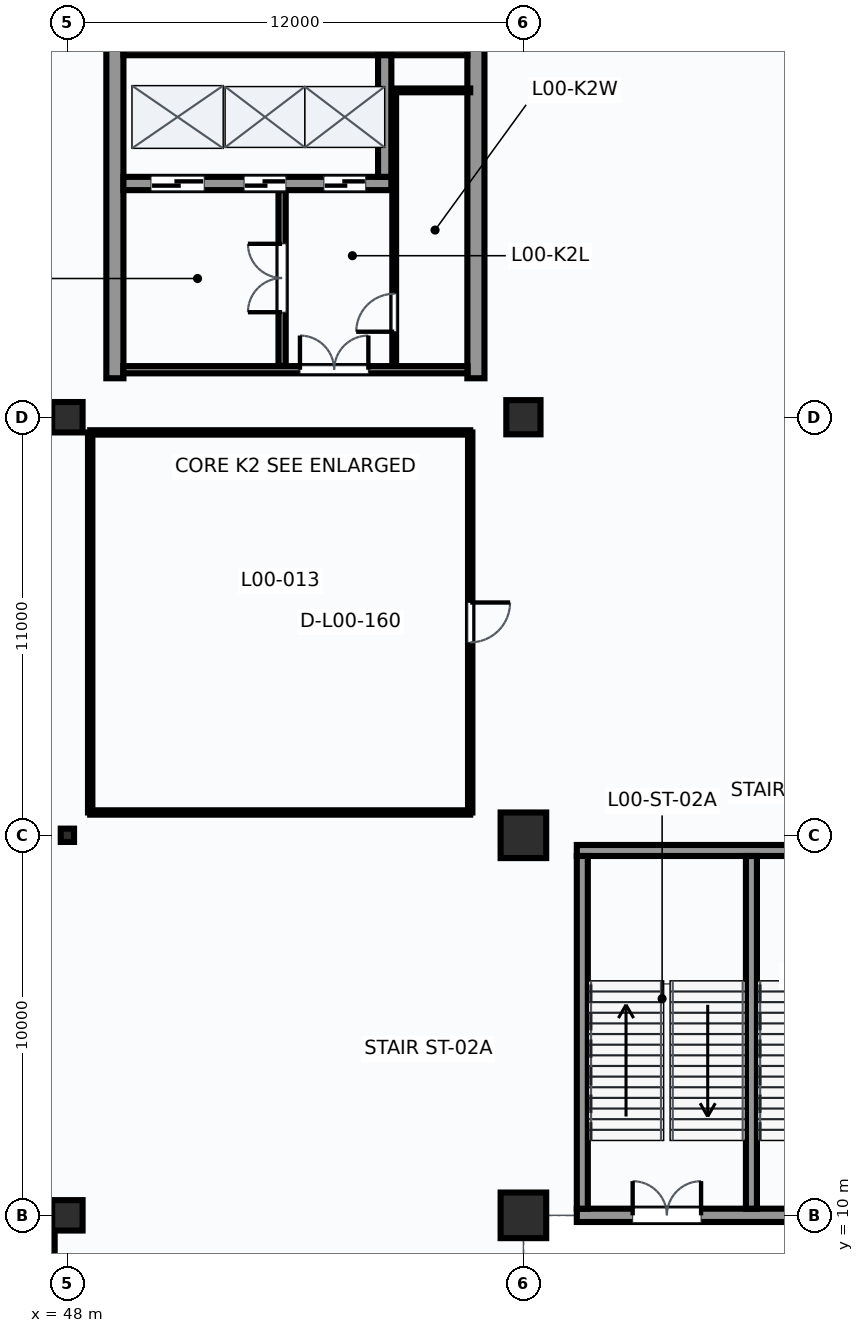
"""IFC4 building model, lengths in metres.
Left out: names, types, materials, properties, quantities, classifications, styles, units other than length and angle.
Written with IfcOpenShell. Run it as: python <this file> out.ifc"""

import sys

from ifc_helpers import new_model, si_unit, direction, frame, frame_2d, origin, origin_2d, place, context, subcontext, project, spatial, rectangle, hollow_rectangle, circle, extrude, element, fill, save


model = new_model("IFC4")
c1 = context("Model", 3, precision=1e-05, world=origin(), true_north=direction((0.0, 1.0)))
c2 = subcontext(c1, "Body", "Model", "MODEL_VIEW")
j1 = project(units=[si_unit("LENGTHUNIT", "METRE"), si_unit("PLANEANGLEUNIT", "RADIAN")], contexts=[c1])
p1 = place(None, origin())
s1 = spatial("IfcSite", under=j1, at=p1, CompositionType="ELEMENT")
p2 = place(p1, origin())
s2 = spatial("IfcBuilding", under=s1, at=p2, CompositionType="ELEMENT")
p3 = place(p2, origin())
s3 = spatial("IfcBuildingStorey", under=s2, at=p3, CompositionType="ELEMENT", Elevation=0.0)
p4 = place(p3, frame((48.0, 10.0, 0.0), z_axis=(0.0, 0.0, 1.0), x_axis=(1.0, 0.0, 0.0)))
e1 = element("IfcColumn", 1, at=p4, inside=s3, PredefinedType="COLUMN", context=c2, shape_type="SweptSolid", body=[
    extrude(rectangle(XDim=0.8, YDim=0.8, at=origin_2d()), origin(), (0.0, 0.0, 1.0), 5.4),
])
p5 = place(p3, frame((48.0, 20.0, 0.0), z_axis=(0.0, 0.0, 1.0), x_axis=(1.0, 0.0, 0.0)))
e2 = element("IfcColumn", 2, at=p5, inside=s3, PredefinedType="COLUMN", context=c2, shape_type="SweptSolid", body=[
    extrude(hollow_rectangle(XDim=0.35, YDim=0.35, WallThickness=0.016, InnerFilletRadius=0.016, OuterFilletRadius=0.032, at=origin_2d()), origin(), (0.0, 0.0, 1.0), 5.4),
])
p6 = place(p3, frame((48.0, 31.0, 0.0), z_axis=(0.0, 0.0, 1.0), x_axis=(1.0, 0.0, 0.0)))
e3 = element("IfcColumn", 3, at=p6, inside=s3, PredefinedType="COLUMN", context=c2, shape_type="SweptSolid", body=[
    extrude(rectangle(XDim=0.8, YDim=0.8, at=origin_2d()), origin(), (0.0, 0.0, 1.0), 5.4),
])
for number, where, z_axis, x_axis in (
    (4, (60.0, 10.0, 0.0), (0.0, 0.0, 1.0), (1.0, 0.0, 0.0)),
    (5, (60.0, 20.0, 0.0), (0.0, 0.0, 1.0), (1.0, 0.0, 0.0)),
):
    element("IfcColumn", number, at=place(p3, frame(where, z_axis=z_axis, x_axis=x_axis)), inside=s3, PredefinedType="COLUMN", context=c2, shape_type="SweptSolid", body=[
        extrude(rectangle(XDim=1.2, YDim=1.2, at=origin_2d()), origin(), (0.0, 0.0, 1.0), 5.4),
    ])
p7 = place(p3, frame((60.0, 31.0, 0.0), z_axis=(0.0, 0.0, 1.0), x_axis=(1.0, 0.0, 0.0)))
e6 = element("IfcColumn", 6, at=p7, inside=s3, PredefinedType="COLUMN", context=c2, shape_type="SweptSolid", body=[
    extrude(circle(Radius=0.45, at=origin_2d()), origin(), (0.0, 0.0, 1.0), 5.4),
])
p8 = place(p3, frame((61.405, 10.0, 0.0), z_axis=(0.0, 0.0, 1.0), x_axis=(1.0, 0.0, 0.0)))
e7 = element("IfcWall", 7, at=p8, inside=s3, PredefinedType="SHEAR", context=c2, shape_type="SweptSolid", body=[
    extrude(rectangle(XDim=9.19, YDim=0.35, at=frame_2d((4.595, 0.0))), origin(), (0.0, 0.0, 1.0), 4.347),
])
p9 = place(p8, frame((1.47, 0.0, 0.0)))
e8 = element("IfcOpeningElement", 8, at=p9, cuts=e7, PredefinedType="OPENING", context=c2, shape_type="SweptSolid", body=[
    extrude(rectangle(XDim=1.8, YDim=2.2, at=frame_2d((0.9, 1.1))), frame((0.0, 0.185, 0.0), z_axis=(0.0, -1.0, 0.0), x_axis=(1.0, 0.0, 0.0)), (0.0, 0.0, 1.0), 0.37),
])
p10 = place(p8, frame((6.02, 0.0, 0.0)))
e9 = element("IfcOpeningElement", 9, at=p10, cuts=e7, PredefinedType="OPENING", context=c2, shape_type="SweptSolid", body=[
    extrude(rectangle(XDim=1.6, YDim=2.2, at=frame_2d((0.8, 1.1))), frame((0.0, 0.185, 0.0), z_axis=(0.0, -1.0, 0.0), x_axis=(1.0, 0.0, 0.0)), (0.0, 0.0, 1.0), 0.37),
])
p11 = place(p3, frame((61.405, 19.6, 0.0), z_axis=(0.0, 0.0, 1.0), x_axis=(1.0, 0.0, 0.0)))
e10 = element("IfcWall", 10, at=p11, inside=s3, PredefinedType="SHEAR", context=c2, shape_type="SweptSolid", body=[
    extrude(rectangle(XDim=9.19, YDim=0.29, at=frame_2d((4.595, 0.0))), origin(), (0.0, 0.0, 1.0), 5.4),
])
for number, where, z_axis, x_axis in (
    (11, (61.55, 10.175, 0.0), (0.0, 0.0, 1.0), (0.0, 1.0, 0.0)),
    (12, (66.0, 10.175, 0.0), (0.0, 0.0, 1.0), (0.0, 1.0, 0.0)),
):
    element("IfcWall", number, at=place(p3, frame(where, z_axis=z_axis, x_axis=x_axis)), inside=s3, PredefinedType="SHEAR", context=c2, shape_type="SweptSolid", body=[
        extrude(rectangle(XDim=9.28, YDim=0.29, at=frame_2d((4.64, 0.0))), origin(), (0.0, 0.0, 1.0), 5.4),
    ])
for number, where, z_axis, x_axis in (
    (13, (49.25, 32.025, 0.0), (0.0, 0.0, 1.0), (0.0, 1.0, 0.0)),
    (14, (58.75, 32.025, 0.0), (0.0, 0.0, 1.0), (0.0, 1.0, 0.0)),
):
    element("IfcWall", number, at=place(p3, frame(where, z_axis=z_axis, x_axis=x_axis)), inside=s3, PredefinedType="SHEAR", context=c2, shape_type="SweptSolid", body=[
        extrude(rectangle(XDim=8.95, YDim=0.45, at=frame_2d((4.475, 0.0))), origin(), (0.0, 0.0, 1.0), 5.4),
    ])
p12 = place(p3, frame((49.475, 40.75, 0.0), z_axis=(0.0, 0.0, 1.0), x_axis=(1.0, 0.0, 0.0)))
e15 = element("IfcWall", 15, at=p12, inside=s3, PredefinedType="SHEAR", context=c2, shape_type="SweptSolid", body=[
    extrude(rectangle(XDim=9.05, YDim=0.45, at=frame_2d((4.525, 0.0))), origin(), (0.0, 0.0, 1.0), 5.4),
])
p13 = place(p3, frame((49.475, 37.15, 0.0), z_axis=(0.0, 0.0, 1.0), x_axis=(1.0, 0.0, 0.0)))
e16 = element("IfcWall", 16, at=p13, inside=s3, PredefinedType="SHEAR", context=c2, shape_type="SweptSolid", body=[
    extrude(rectangle(XDim=7.05, YDim=0.35, at=frame_2d((3.525, 0.0))), origin(), (0.0, 0.0, 1.0), 5.4),
])
p14 = place(p13, frame((0.725, 0.0, 0.0)))
e17 = element("IfcOpeningElement", 17, at=p14, cuts=e16, PredefinedType="OPENING", context=c2, shape_type="SweptSolid", body=[
    extrude(rectangle(XDim=1.4, YDim=2.3, at=frame_2d((0.7, 1.15))), frame((0.0, 0.185, 0.0), z_axis=(0.0, -1.0, 0.0), x_axis=(1.0, 0.0, 0.0)), (0.0, 0.0, 1.0), 0.37),
])
p15 = place(p13, frame((3.175, 0.0, 0.0)))
e18 = element("IfcOpeningElement", 18, at=p15, cuts=e16, PredefinedType="OPENING", context=c2, shape_type="SweptSolid", body=[
    extrude(rectangle(XDim=1.1, YDim=2.2, at=frame_2d((0.55, 1.1))), frame((0.0, 0.185, 0.0), z_axis=(0.0, -1.0, 0.0), x_axis=(1.0, 0.0, 0.0)), (0.0, 0.0, 1.0), 0.37),
])
p16 = place(p13, frame((5.275, 0.0, 0.0)))
e19 = element("IfcOpeningElement", 19, at=p16, cuts=e16, PredefinedType="OPENING", context=c2, shape_type="SweptSolid", body=[
    extrude(rectangle(XDim=1.1, YDim=2.2, at=frame_2d((0.55, 1.1))), frame((0.0, 0.185, 0.0), z_axis=(0.0, -1.0, 0.0), x_axis=(1.0, 0.0, 0.0)), (0.0, 0.0, 1.0), 0.37),
])
p17 = place(p3, frame((56.35, 37.325, 0.0), z_axis=(0.0, 0.0, 1.0), x_axis=(0.0, 1.0, 0.0)))
e20 = element("IfcWall", 20, at=p17, inside=s3, PredefinedType="SHEAR", context=c2, shape_type="SweptSolid", body=[
    extrude(rectangle(XDim=3.2, YDim=0.35, at=frame_2d((1.6, 0.0))), origin(), (0.0, 0.0, 1.0), 5.4),
])
p18 = place(p3, frame((49.47, 32.25, 0.0), z_axis=(0.0, 0.0, 1.0), x_axis=(1.0, 0.0, 0.0)))
e21 = element("IfcWall", 21, at=p18, inside=s3, PredefinedType="PARTITIONING", context=c2, shape_type="SweptSolid", body=[
    extrude(rectangle(XDim=9.06, YDim=0.19, at=frame_2d((4.53, 0.0))), origin(), (0.0, 0.0, 1.0), 5.06),
])
p19 = place(p18, frame((4.65, 0.0, 0.0)))
e22 = element("IfcOpeningElement", 22, at=p19, cuts=e21, PredefinedType="OPENING", context=c2, shape_type="SweptSolid", body=[
    extrude(rectangle(XDim=1.8, YDim=2.3, at=frame_2d((0.9, 1.15))), frame((0.0, 0.105, 0.0), z_axis=(0.0, -1.0, 0.0), x_axis=(1.0, 0.0, 0.0)), (0.0, 0.0, 1.0), 0.21),
])
p20 = place(p3, frame((53.65, 32.35, 0.0), z_axis=(0.0, 0.0, 1.0), x_axis=(0.0, 1.0, 0.0)))
e23 = element("IfcWall", 23, at=p20, inside=s3, PredefinedType="PARTITIONING", context=c2, shape_type="SweptSolid", body=[
    extrude(rectangle(XDim=4.625, YDim=0.19, at=frame_2d((2.312, 0.0))), origin(), (0.0, 0.0, 1.0), 5.06),
])
p21 = place(p20, frame((1.413, 0.0, 0.0)))
e24 = element("IfcOpeningElement", 24, at=p21, cuts=e23, PredefinedType="OPENING", context=c2, shape_type="SweptSolid", body=[
    extrude(rectangle(XDim=1.8, YDim=2.2, at=frame_2d((0.9, 1.1))), frame((0.0, 0.105, 0.0), z_axis=(0.0, -1.0, 0.0), x_axis=(1.0, 0.0, 0.0)), (0.0, 0.0, 1.0), 0.21),
])
p22 = place(p3, frame((56.6, 32.35, 0.0), z_axis=(0.0, 0.0, 1.0), x_axis=(0.0, 1.0, 0.0)))
e25 = element("IfcWall", 25, at=p22, inside=s3, PredefinedType="PARTITIONING", context=c2, shape_type="SweptSolid", body=[
    extrude(rectangle(XDim=7.25, YDim=0.1, at=frame_2d((3.625, 0.0))), origin(), (0.0, 0.0, 1.0), 5.06),
])
p23 = place(p22, frame((0.9, 0.0, 0.0)))
e26 = element("IfcOpeningElement", 26, at=p23, cuts=e25, PredefinedType="OPENING", context=c2, shape_type="SweptSolid", body=[
    extrude(rectangle(XDim=1.0, YDim=2.1, at=frame_2d((0.5, 1.05))), frame((0.0, 0.06, 0.0), z_axis=(0.0, -1.0, 0.0), x_axis=(1.0, 0.0, 0.0)), (0.0, 0.0, 1.0), 0.12),
])
p24 = place(p3, frame((56.6, 39.6, 0.0), z_axis=(0.0, 0.0, 1.0), x_axis=(1.0, 0.0, 0.0)))
e27 = element("IfcWall", 27, at=p24, inside=s3, PredefinedType="PARTITIONING", context=c2, shape_type="SweptSolid", body=[
    extrude(rectangle(XDim=2.0, YDim=0.1, at=frame_2d((1.0, 0.0))), origin(), (0.0, 0.0, 1.0), 5.06),
])
p25 = place(p3, frame((58.6, 30.6, 0.0), z_axis=(0.0, 0.0, 1.0), x_axis=(0.0, -1.0, 0.0)))
e28 = element("IfcWall", 28, at=p25, inside=s3, PredefinedType="PARTITIONING", context=c2, shape_type="SweptSolid", body=[
    extrude(rectangle(XDim=10.0, YDim=0.115, at=frame_2d((5.0, 0.0))), origin(), (0.0, 0.0, 1.0), 4.567),
])
p26 = place(p25, frame((4.475, 0.0, 0.0)))
e29 = element("IfcOpeningElement", 29, at=p26, cuts=e28, PredefinedType="OPENING", context=c2, shape_type="SweptSolid", body=[
    extrude(rectangle(XDim=1.05, YDim=2.2, at=frame_2d((0.525, 1.1))), frame((0.0, 0.067, 0.0), z_axis=(0.0, -1.0, 0.0), x_axis=(1.0, 0.0, 0.0)), (0.0, 0.0, 1.0), 0.135),
])
p27 = place(p3, frame((58.6, 20.6, 0.0), z_axis=(0.0, 0.0, 1.0), x_axis=(-1.0, 0.0, 0.0)))
e30 = element("IfcWall", 30, at=p27, inside=s3, PredefinedType="PARTITIONING", context=c2, shape_type="SweptSolid", body=[
    extrude(rectangle(XDim=10.0, YDim=0.115, at=frame_2d((5.0, 0.0))), origin(), (0.0, 0.0, 1.0), 5.06),
])
p28 = place(p3, frame((48.6, 20.6, 0.0), z_axis=(0.0, 0.0, 1.0), x_axis=(0.0, 1.0, 0.0)))
e31 = element("IfcWall", 31, at=p28, inside=s3, PredefinedType="PARTITIONING", context=c2, shape_type="SweptSolid", body=[
    extrude(rectangle(XDim=10.0, YDim=0.115, at=frame_2d((5.0, 0.0))), origin(), (0.0, 0.0, 1.0), 4.567),
])
p29 = place(p3, frame((48.6, 30.6, 0.0), z_axis=(0.0, 0.0, 1.0), x_axis=(1.0, 0.0, 0.0)))
e32 = element("IfcWall", 32, at=p29, inside=s3, PredefinedType="PARTITIONING", context=c2, shape_type="SweptSolid", body=[
    extrude(rectangle(XDim=10.0, YDim=0.115, at=frame_2d((5.0, 0.0))), origin(), (0.0, 0.0, 1.0), 5.06),
])
p30 = place(p3, frame((47.6, 9.6, 0.0), z_axis=(0.0, 0.0, 1.0), x_axis=(0.0, -1.0, 0.0)))
e33 = element("IfcWall", 33, at=p30, inside=s3, PredefinedType="PARTITIONING", context=c2, shape_type="SweptSolid", body=[
    extrude(rectangle(XDim=9.0, YDim=0.13, at=frame_2d((4.5, 0.0))), origin(), (0.0, 0.0, 1.0), 4.686),
])
p31 = place(p9, frame((1.8, 0.0, 0.0), z_axis=(0.0, 0.0, 1.0), x_axis=(-1.0, 0.0, 0.0)))
e34 = element("IfcDoor", 34, at=p31, inside=s3, OperationType="DOUBLE_DOOR_SINGLE_SWING", PredefinedType="DOOR", context=c2, shape_type="SweptSolid", body=[
    extrude(rectangle(XDim=1.8, YDim=2.2, at=frame_2d((0.9, 1.1))), frame((0.0, 0.025, 0.0), z_axis=(0.0, -1.0, 0.0), x_axis=(1.0, 0.0, 0.0)), (0.0, 0.0, 1.0), 0.05),
])
fill(e8, e34)
p32 = place(p14, origin())
e35 = element("IfcDoor", 35, at=p32, inside=s3, OperationType="SLIDING_TO_LEFT", PredefinedType="DOOR", context=c2, shape_type="SweptSolid", body=[
    extrude(rectangle(XDim=1.4, YDim=2.3, at=frame_2d((0.7, 1.15))), frame((0.0, 0.025, 0.0), z_axis=(0.0, -1.0, 0.0), x_axis=(1.0, 0.0, 0.0)), (0.0, 0.0, 1.0), 0.05),
])
fill(e17, e35)
p33 = place(p15, origin())
e36 = element("IfcDoor", 36, at=p33, inside=s3, OperationType="SLIDING_TO_LEFT", PredefinedType="DOOR", context=c2, shape_type="SweptSolid", body=[
    extrude(rectangle(XDim=1.1, YDim=2.2, at=frame_2d((0.55, 1.1))), frame((0.0, 0.025, 0.0), z_axis=(0.0, -1.0, 0.0), x_axis=(1.0, 0.0, 0.0)), (0.0, 0.0, 1.0), 0.05),
])
fill(e18, e36)
p34 = place(p16, origin())
e37 = element("IfcDoor", 37, at=p34, inside=s3, OperationType="SLIDING_TO_LEFT", PredefinedType="DOOR", context=c2, shape_type="SweptSolid", body=[
    extrude(rectangle(XDim=1.1, YDim=2.2, at=frame_2d((0.55, 1.1))), frame((0.0, 0.025, 0.0), z_axis=(0.0, -1.0, 0.0), x_axis=(1.0, 0.0, 0.0)), (0.0, 0.0, 1.0), 0.05),
])
fill(e19, e37)
p35 = place(p19, origin())
e38 = element("IfcDoor", 38, at=p35, inside=s3, OperationType="DOUBLE_DOOR_SINGLE_SWING", PredefinedType="DOOR", context=c2, shape_type="SweptSolid", body=[
    extrude(rectangle(XDim=1.8, YDim=2.3, at=frame_2d((0.9, 1.15))), frame((0.0, 0.025, 0.0), z_axis=(0.0, -1.0, 0.0), x_axis=(1.0, 0.0, 0.0)), (0.0, 0.0, 1.0), 0.05),
])
fill(e22, e38)
p36 = place(p21, origin())
e39 = element("IfcDoor", 39, at=p36, inside=s3, OperationType="DOUBLE_DOOR_SINGLE_SWING", PredefinedType="DOOR", context=c2, shape_type="SweptSolid", body=[
    extrude(rectangle(XDim=1.8, YDim=2.2, at=frame_2d((0.9, 1.1))), frame((0.0, 0.025, 0.0), z_axis=(0.0, -1.0, 0.0), x_axis=(1.0, 0.0, 0.0)), (0.0, 0.0, 1.0), 0.05),
])
fill(e24, e39)
p37 = place(p23, origin())
e40 = element("IfcDoor", 40, at=p37, inside=s3, OperationType="SINGLE_SWING_LEFT", PredefinedType="DOOR", context=c2, shape_type="SweptSolid", body=[
    extrude(rectangle(XDim=1.0, YDim=2.1, at=frame_2d((0.5, 1.05))), frame((0.0, 0.025, 0.0), z_axis=(0.0, -1.0, 0.0), x_axis=(1.0, 0.0, 0.0)), (0.0, 0.0, 1.0), 0.05),
])
fill(e26, e40)
p38 = place(p26, origin())
e41 = element("IfcDoor", 41, at=p38, inside=s3, OperationType="SINGLE_SWING_LEFT", PredefinedType="DOOR", context=c2, shape_type="SweptSolid", body=[
    extrude(rectangle(XDim=1.05, YDim=2.2, at=frame_2d((0.525, 1.1))), frame((0.0, 0.025, 0.0), z_axis=(0.0, -1.0, 0.0), x_axis=(1.0, 0.0, 0.0)), (0.0, 0.0, 1.0), 0.05),
])
fill(e29, e41)
save(model, sys.argv[1])
